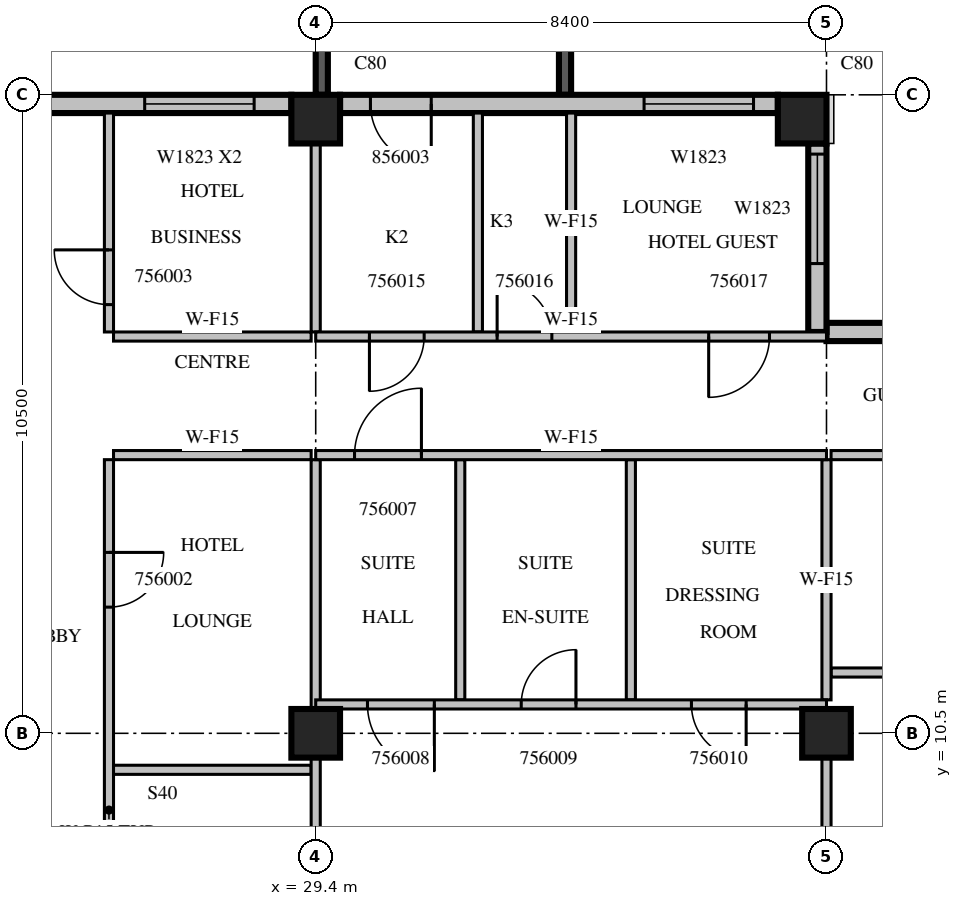
"""IFC4 building model, lengths in metres.
Left out: names, types, materials, properties, quantities, classifications, styles, units other than length and angle.
Written with IfcOpenShell. Run it as: python <this file> out.ifc"""

import sys

from ifc_helpers import new_model, si_unit, direction, frame, frame_2d, origin, origin_2d, place, context, subcontext, project, spatial, rectangle, extrude, source, transform, mapped, element, fill, save


model = new_model("IFC4")
c1 = context("Model", 3, precision=1e-05, world=origin(), true_north=direction((0.0, 1.0)))
c2 = subcontext(c1, "Body", "Model", "MODEL_VIEW")
j1 = project(units=[si_unit("LENGTHUNIT", "METRE"), si_unit("PLANEANGLEUNIT", "RADIAN")], contexts=[c1])
p1 = place(None, origin())
s1 = spatial("IfcSite", under=j1, at=p1, CompositionType="ELEMENT")
p2 = place(p1, origin())
s2 = spatial("IfcBuilding", under=s1, at=p2, CompositionType="ELEMENT")
p3 = place(p2, frame((0.0, 0.0, 246.2)))
s3 = spatial("IfcBuildingStorey", under=s2, at=p3, CompositionType="ELEMENT", Elevation=246.2)
m1 = source(origin(), c2, "Body", "SweptSolid", [
    extrude(rectangle(XDim=0.8, YDim=0.8, at=origin_2d()), origin(), (0.0, 0.0, 1.0), 3.8),
])
for number, where, z_axis, x_axis in (
    (1, (29.4, 10.5, 0.0), (0.0, 0.0, 1.0), (1.0, 0.0, 0.0)),
    (2, (37.8, 10.5, 0.0), (0.0, 0.0, 1.0), (1.0, 0.0, 0.0)),
    (3, (29.4, 20.6, 0.0), (0.0, 0.0, 1.0), (1.0, 0.0, 0.0)),
    (4, (37.4, 20.6, 0.0), (0.0, 0.0, 1.0), (1.0, 0.0, 0.0)),
):
    element("IfcColumn", number, at=place(p3, frame(where, z_axis=z_axis, x_axis=x_axis)), inside=s3, PredefinedType="COLUMN", context=c2, shape_type="MappedRepresentation", body=[
        mapped(m1, transform((0.0, 0.0, 0.0), scale=1.0)),
    ])
m2 = source(origin(), c2, "Body", "SweptSolid", [
    extrude(rectangle(XDim=3.9, YDim=0.2, at=frame_2d((1.95, 0.0))), origin(), (0.0, 0.0, 1.0), 3.4),
])
p4 = place(p3, frame((33.5, 21.0, 0.0), z_axis=(0.0, 0.0, 1.0), x_axis=(0.0, 1.0, 0.0)))
e5 = element("IfcWall", 5, at=p4, inside=s3, PredefinedType="SOLIDWALL", context=c2, shape_type="MappedRepresentation", body=[
    mapped(m2, transform((0.0, 0.0, 0.0), scale=1.0)),
])
m3 = source(origin(), c2, "Body", "SweptSolid", [
    extrude(rectangle(XDim=2.4, YDim=2.3, at=frame_2d((1.2, 1.15))), frame((0.0, 0.11, 0.0), z_axis=(0.0, -1.0, 0.0), x_axis=(1.0, 0.0, 0.0)), (0.0, 0.0, 1.0), 0.22),
])
p5 = place(p4, frame((0.75, 0.0, 0.6)))
e6 = element("IfcOpeningElement", 6, at=p5, cuts=e5, PredefinedType="OPENING", context=c2, shape_type="MappedRepresentation", body=[
    mapped(m3, transform((0.0, 0.0, 0.0), scale=1.0)),
])
p6 = place(p3, frame((29.5, 21.0, 0.0), z_axis=(0.0, 0.0, 1.0), x_axis=(0.0, 1.0, 0.0)))
e7 = element("IfcWall", 7, at=p6, inside=s3, PredefinedType="SOLIDWALL", context=c2, shape_type="MappedRepresentation", body=[
    mapped(m2, transform((0.0, 0.0, 0.0), scale=1.0)),
])
p7 = place(p6, frame((0.75, 0.0, 0.6)))
e8 = element("IfcOpeningElement", 8, at=p7, cuts=e7, PredefinedType="OPENING", context=c2, shape_type="MappedRepresentation", body=[
    mapped(m3, transform((0.0, 0.0, 0.0), scale=1.0)),
])
m4 = source(origin(), c2, "Body", "SweptSolid", [
    extrude(rectangle(XDim=15.96, YDim=0.3, at=frame_2d((7.98, 0.0))), origin(), (0.0, 0.0, 1.0), 3.4),
])
p8 = place(p3, frame((53.76, 17.1, 0.0), z_axis=(0.0, 0.0, 1.0), x_axis=(-1.0, 0.0, 0.0)))
e9 = element("IfcWall", 9, at=p8, inside=s3, PredefinedType="STANDARD", context=c2, shape_type="MappedRepresentation", body=[
    mapped(m4, transform((0.0, 0.0, 0.0), scale=1.0)),
])
m5 = source(origin(), c2, "Body", "SweptSolid", [
    extrude(rectangle(XDim=3.0, YDim=2.3, at=frame_2d((1.5, 1.15))), frame((0.0, 0.16, 0.0), z_axis=(0.0, -1.0, 0.0), x_axis=(1.0, 0.0, 0.0)), (0.0, 0.0, 1.0), 0.32),
])
p9 = place(p8, frame((0.6, 0.0, 0.6)))
e10 = element("IfcOpeningElement", 10, at=p9, cuts=e9, PredefinedType="OPENING", context=c2, shape_type="MappedRepresentation", body=[
    mapped(m5, transform((0.0, 0.0, 0.0), scale=1.0)),
])
p10 = place(p8, frame((4.8, 0.0, 0.6)))
e11 = element("IfcOpeningElement", 11, at=p10, cuts=e9, PredefinedType="OPENING", context=c2, shape_type="MappedRepresentation", body=[
    mapped(m5, transform((0.0, 0.0, 0.0), scale=1.0)),
])
m6 = source(origin(), c2, "Body", "SweptSolid", [
    extrude(rectangle(XDim=3.6, YDim=2.3, at=frame_2d((1.8, 1.15))), frame((0.0, 0.16, 0.0), z_axis=(0.0, -1.0, 0.0), x_axis=(1.0, 0.0, 0.0)), (0.0, 0.0, 1.0), 0.32),
])
p11 = place(p8, frame((9.54, 0.0, 0.6)))
e12 = element("IfcOpeningElement", 12, at=p11, cuts=e9, PredefinedType="OPENING", context=c2, shape_type="MappedRepresentation", body=[
    mapped(m6, transform((0.0, 0.0, 0.0), scale=1.0)),
])
m7 = source(origin(), c2, "Body", "SweptSolid", [
    extrude(rectangle(XDim=3.1, YDim=0.3, at=frame_2d((1.55, 0.0))), origin(), (0.0, 0.0, 1.0), 3.4),
])
p12 = place(p3, frame((37.65, 17.1, 0.0), z_axis=(0.0, 0.0, 1.0), x_axis=(0.0, 1.0, 0.0)))
e13 = element("IfcWall", 13, at=p12, inside=s3, PredefinedType="STANDARD", context=c2, shape_type="MappedRepresentation", body=[
    mapped(m7, transform((0.0, 0.0, 0.0), scale=1.0)),
])
m8 = source(origin(), c2, "Body", "SweptSolid", [
    extrude(rectangle(XDim=1.8, YDim=2.3, at=frame_2d((0.9, 1.15))), frame((0.0, 0.16, 0.0), z_axis=(0.0, -1.0, 0.0), x_axis=(1.0, 0.0, 0.0)), (0.0, 0.0, 1.0), 0.32),
])
p13 = place(p12, frame((1.125, 0.0, 0.6)))
e14 = element("IfcOpeningElement", 14, at=p13, cuts=e13, PredefinedType="OPENING", context=c2, shape_type="MappedRepresentation", body=[
    mapped(m8, transform((0.0, 0.0, 0.0), scale=1.0)),
])
m9 = source(origin(), c2, "Body", "SweptSolid", [
    extrude(rectangle(XDim=7.2, YDim=0.3, at=frame_2d((3.6, 0.0))), origin(), (0.0, 0.0, 1.0), 3.4),
])
p14 = place(p3, frame((37.0, 20.85, 0.0), z_axis=(0.0, 0.0, 1.0), x_axis=(-1.0, 0.0, 0.0)))
e15 = element("IfcWall", 15, at=p14, inside=s3, PredefinedType="STANDARD", context=c2, shape_type="MappedRepresentation", body=[
    mapped(m9, transform((0.0, 0.0, 0.0), scale=1.0)),
])
p15 = place(p14, frame((0.4, 0.0, 0.6)))
e16 = element("IfcOpeningElement", 16, at=p15, cuts=e15, PredefinedType="OPENING", context=c2, shape_type="MappedRepresentation", body=[
    mapped(m8, transform((0.0, 0.0, 0.0), scale=1.0)),
])
m10 = source(origin(), c2, "Body", "SweptSolid", [
    extrude(rectangle(XDim=1.0, YDim=2.1, at=frame_2d((0.5, 1.05))), frame((0.0, 0.16, 0.0), z_axis=(0.0, -1.0, 0.0), x_axis=(1.0, 0.0, 0.0)), (0.0, 0.0, 1.0), 0.32),
])
p16 = place(p14, frame((5.7, 0.0, 0.0)))
e17 = element("IfcOpeningElement", 17, at=p16, cuts=e15, PredefinedType="OPENING", context=c2, shape_type="MappedRepresentation", body=[
    mapped(m10, transform((0.0, 0.0, 0.0), scale=1.0)),
])
p17 = place(p3, frame((29.0, 20.85, 0.0), z_axis=(0.0, 0.0, 1.0), x_axis=(-1.0, 0.0, 0.0)))
e18 = element("IfcWall", 18, at=p17, inside=s3, PredefinedType="STANDARD", context=c2, shape_type="MappedRepresentation", body=[
    mapped(m9, transform((0.0, 0.0, 0.0), scale=1.0)),
])
p18 = place(p17, frame((0.613, 0.0, 0.6)))
e19 = element("IfcOpeningElement", 19, at=p18, cuts=e18, PredefinedType="OPENING", context=c2, shape_type="MappedRepresentation", body=[
    mapped(m8, transform((0.0, 0.0, 0.0), scale=1.0)),
])
p19 = place(p17, frame((5.0, 0.0, 0.6)))
e20 = element("IfcOpeningElement", 20, at=p19, cuts=e18, PredefinedType="OPENING", context=c2, shape_type="MappedRepresentation", body=[
    mapped(m8, transform((0.0, 0.0, 0.0), scale=1.0)),
])
m11 = source(origin(), c2, "Body", "SweptSolid", [
    extrude(rectangle(XDim=11.525, YDim=0.15, at=frame_2d((5.763, 0.0))), origin(), (0.0, 0.0, 1.0), 3.4),
])
p20 = place(p3, frame((26.0, 15.0, 0.0), z_axis=(0.0, 0.0, 1.0), x_axis=(0.0, -1.0, 0.0)))
e21 = element("IfcWall", 21, at=p20, inside=s3, PredefinedType="PARTITIONING", context=c2, shape_type="MappedRepresentation", body=[
    mapped(m11, transform((0.0, 0.0, 0.0), scale=1.0)),
])
m12 = source(origin(), c2, "Body", "SweptSolid", [
    extrude(rectangle(XDim=0.9, YDim=2.1, at=frame_2d((0.45, 1.05))), frame((0.0, 0.085, 0.0), z_axis=(0.0, -1.0, 0.0), x_axis=(1.0, 0.0, 0.0)), (0.0, 0.0, 1.0), 0.17),
])
p21 = place(p20, frame((8.162, 0.0, 0.0)))
e22 = element("IfcOpeningElement", 22, at=p21, cuts=e21, PredefinedType="OPENING", context=c2, shape_type="MappedRepresentation", body=[
    mapped(m12, transform((0.0, 0.0, 0.0), scale=1.0)),
])
p22 = place(p20, frame((1.525, 0.0, 0.0)))
e23 = element("IfcOpeningElement", 23, at=p22, cuts=e21, PredefinedType="OPENING", context=c2, shape_type="MappedRepresentation", body=[
    mapped(m12, transform((0.0, 0.0, 0.0), scale=1.0)),
])
m13 = source(origin(), c2, "Body", "SweptSolid", [
    extrude(rectangle(XDim=3.6, YDim=0.15, at=frame_2d((1.8, 0.0))), origin(), (0.0, 0.0, 1.0), 3.4),
])
p23 = place(p3, frame((26.0, 20.7, 0.0), z_axis=(0.0, 0.0, 1.0), x_axis=(0.0, -1.0, 0.0)))
e24 = element("IfcWall", 24, at=p23, inside=s3, PredefinedType="PARTITIONING", context=c2, shape_type="MappedRepresentation", body=[
    mapped(m13, transform((0.0, 0.0, 0.0), scale=1.0)),
])
p24 = place(p23, frame((2.25, 0.0, 0.0)))
e25 = element("IfcOpeningElement", 25, at=p24, cuts=e24, PredefinedType="OPENING", context=c2, shape_type="MappedRepresentation", body=[
    mapped(m12, transform((0.0, 0.0, 0.0), scale=1.0)),
])
p25 = place(p3, frame((29.325, 9.9, 0.0), z_axis=(0.0, 0.0, 1.0), x_axis=(-1.0, 0.0, 0.0)))
e26 = element("IfcWall", 26, at=p25, inside=s3, PredefinedType="PARTITIONING", context=c2, shape_type="SweptSolid", body=[
    extrude(rectangle(XDim=3.25, YDim=0.15, at=frame_2d((1.625, 0.0))), origin(), (0.0, 0.0, 1.0), 3.4),
])
m14 = source(origin(), c2, "Body", "SweptSolid", [
    extrude(rectangle(XDim=3.25, YDim=0.15, at=frame_2d((1.625, 0.0))), origin(), (0.0, 0.0, 1.0), 3.4),
])
for number, where, z_axis, x_axis in (
    (27, (29.325, 15.075, 0.0), (0.0, 0.0, 1.0), (-1.0, 0.0, 0.0)),
    (28, (26.075, 17.025, 0.0), (0.0, 0.0, 1.0), (1.0, 0.0, 0.0)),
):
    element("IfcWall", number, at=place(p3, frame(where, z_axis=z_axis, x_axis=x_axis)), inside=s3, PredefinedType="PARTITIONING", context=c2, shape_type="MappedRepresentation", body=[
        mapped(m14, transform((0.0, 0.0, 0.0), scale=1.0)),
    ])
m15 = source(origin(), c2, "Body", "SweptSolid", [
    extrude(rectangle(XDim=6.626, YDim=0.15, at=frame_2d((3.313, 0.0))), origin(), (0.0, 0.0, 1.0), 3.4),
])
p26 = place(p3, frame((29.4, 3.475, 0.0), z_axis=(0.0, 0.0, 1.0), x_axis=(0.0, 1.0, 0.0)))
e29 = element("IfcWall", 29, at=p26, inside=s3, PredefinedType="PARTITIONING", context=c2, shape_type="MappedRepresentation", body=[
    mapped(m15, transform((0.0, 0.0, 0.0), scale=1.0)),
])
m16 = source(origin(), c2, "Body", "SweptSolid", [
    extrude(rectangle(XDim=4.101, YDim=0.15, at=frame_2d((2.05, 0.0))), origin(), (0.0, 0.0, 1.0), 3.4),
])
p27 = place(p3, frame((29.4, 10.899, 0.0), z_axis=(0.0, 0.0, 1.0), x_axis=(0.0, 1.0, 0.0)))
e30 = element("IfcWall", 30, at=p27, inside=s3, PredefinedType="PARTITIONING", context=c2, shape_type="MappedRepresentation", body=[
    mapped(m16, transform((0.0, 0.0, 0.0), scale=1.0)),
])
m17 = source(origin(), c2, "Body", "SweptSolid", [
    extrude(rectangle(XDim=3.101, YDim=0.15, at=frame_2d((1.55, 0.0))), origin(), (0.0, 0.0, 1.0), 3.4),
])
p28 = place(p3, frame((29.4, 17.1, 0.0), z_axis=(0.0, 0.0, 1.0), x_axis=(0.0, 1.0, 0.0)))
e31 = element("IfcWall", 31, at=p28, inside=s3, PredefinedType="PARTITIONING", context=c2, shape_type="MappedRepresentation", body=[
    mapped(m17, transform((0.0, 0.0, 0.0), scale=1.0)),
])
m18 = source(origin(), c2, "Body", "SweptSolid", [
    extrude(rectangle(XDim=6.45, YDim=0.15, at=frame_2d((3.225, 0.0))), origin(), (0.0, 0.0, 1.0), 3.4),
])
p29 = place(p3, frame((37.875, 11.5, 0.0), z_axis=(0.0, 0.0, 1.0), x_axis=(1.0, 0.0, 0.0)))
e32 = element("IfcWall", 32, at=p29, inside=s3, PredefinedType="PARTITIONING", context=c2, shape_type="MappedRepresentation", body=[
    mapped(m18, transform((0.0, 0.0, 0.0), scale=1.0)),
])
p30 = place(p3, frame((44.325, 15.075, 0.0), z_axis=(0.0, 0.0, 1.0), x_axis=(-1.0, 0.0, 0.0)))
e33 = element("IfcWall", 33, at=p30, inside=s3, PredefinedType="PARTITIONING", context=c2, shape_type="MappedRepresentation", body=[
    mapped(m18, transform((0.0, 0.0, 0.0), scale=1.0)),
])
p31 = place(p30, frame((2.812, 0.0, 0.0)))
e34 = element("IfcOpeningElement", 34, at=p31, cuts=e33, PredefinedType="OPENING", context=c2, shape_type="MappedRepresentation", body=[
    mapped(m12, transform((0.0, 0.0, 0.0), scale=1.0)),
])
m19 = source(origin(), c2, "Body", "SweptSolid", [
    extrude(rectangle(XDim=3.95, YDim=0.15, at=frame_2d((1.975, 0.0))), origin(), (0.0, 0.0, 1.0), 3.4),
])
for number, where, z_axis, x_axis in (
    (35, (31.777, 11.05, 0.0), (0.0, 0.0, 1.0), (0.0, 1.0, 0.0)),
    (36, (34.583, 11.05, 0.0), (0.0, 0.0, 1.0), (0.0, 1.0, 0.0)),
):
    element("IfcWall", number, at=place(p3, frame(where, z_axis=z_axis, x_axis=x_axis)), inside=s3, PredefinedType="PARTITIONING", context=c2, shape_type="MappedRepresentation", body=[
        mapped(m19, transform((0.0, 0.0, 0.0), scale=1.0)),
    ])
m20 = source(origin(), c2, "Body", "SweptSolid", [
    extrude(rectangle(XDim=9.302, YDim=0.15, at=frame_2d((4.651, 0.0))), origin(), (0.0, 0.0, 1.0), 3.4),
])
p32 = place(p3, frame((37.8, 0.799, 0.0), z_axis=(0.0, 0.0, 1.0), x_axis=(0.0, 1.0, 0.0)))
e37 = element("IfcWall", 37, at=p32, inside=s3, PredefinedType="PARTITIONING", context=c2, shape_type="MappedRepresentation", body=[
    mapped(m20, transform((0.0, 0.0, 0.0), scale=1.0)),
])
p33 = place(p3, frame((37.8, 11.05, 0.0), z_axis=(0.0, 0.0, 1.0), x_axis=(0.0, 1.0, 0.0)))
e38 = element("IfcWall", 38, at=p33, inside=s3, PredefinedType="PARTITIONING", context=c2, shape_type="MappedRepresentation", body=[
    mapped(m19, transform((0.0, 0.0, 0.0), scale=1.0)),
])
m21 = source(origin(), c2, "Body", "SweptSolid", [
    extrude(rectangle(XDim=8.4, YDim=0.15, at=frame_2d((4.2, 0.0))), origin(), (0.0, 0.0, 1.0), 3.4),
])
p34 = place(p3, frame((37.8, 10.975, 0.0), z_axis=(0.0, 0.0, 1.0), x_axis=(-1.0, 0.0, 0.0)))
e39 = element("IfcWall", 39, at=p34, inside=s3, PredefinedType="PARTITIONING", context=c2, shape_type="MappedRepresentation", body=[
    mapped(m21, transform((0.0, 0.0, 0.0), scale=1.0)),
])
m22 = source(origin(), c2, "Body", "SweptSolid", [
    extrude(rectangle(XDim=1.1, YDim=2.1, at=frame_2d((0.55, 1.05))), frame((0.0, 0.085, 0.0), z_axis=(0.0, -1.0, 0.0), x_axis=(1.0, 0.0, 0.0)), (0.0, 0.0, 1.0), 0.17),
])
p35 = place(p34, frame((6.449, 0.0, 0.0)))
e40 = element("IfcOpeningElement", 40, at=p35, cuts=e39, PredefinedType="OPENING", context=c2, shape_type="MappedRepresentation", body=[
    mapped(m22, transform((0.0, 0.0, 0.0), scale=1.0)),
])
p36 = place(p34, frame((4.12, 0.0, 0.0)))
e41 = element("IfcOpeningElement", 41, at=p36, cuts=e39, PredefinedType="OPENING", context=c2, shape_type="MappedRepresentation", body=[
    mapped(m12, transform((0.0, 0.0, 0.0), scale=1.0)),
])
p37 = place(p34, frame((1.321, 0.0, 0.0)))
e42 = element("IfcOpeningElement", 42, at=p37, cuts=e39, PredefinedType="OPENING", context=c2, shape_type="MappedRepresentation", body=[
    mapped(m12, transform((0.0, 0.0, 0.0), scale=1.0)),
])
for number, where, z_axis, x_axis in (
    (43, (32.067, 20.7, 0.0), (0.0, 0.0, 1.0), (0.0, -1.0, 0.0)),
    (44, (33.6, 17.1, 0.0), (0.0, 0.0, 1.0), (0.0, 1.0, 0.0)),
):
    element("IfcWall", number, at=place(p3, frame(where, z_axis=z_axis, x_axis=x_axis)), inside=s3, PredefinedType="PARTITIONING", context=c2, shape_type="MappedRepresentation", body=[
        mapped(m13, transform((0.0, 0.0, 0.0), scale=1.0)),
    ])
p38 = place(p3, frame((37.8, 15.075, 0.0), z_axis=(0.0, 0.0, 1.0), x_axis=(-1.0, 0.0, 0.0)))
e45 = element("IfcWall", 45, at=p38, inside=s3, PredefinedType="PARTITIONING", context=c2, shape_type="MappedRepresentation", body=[
    mapped(m21, transform((0.0, 0.0, 0.0), scale=1.0)),
])
p39 = place(p38, frame((6.662, 0.0, 0.0)))
e46 = element("IfcOpeningElement", 46, at=p39, cuts=e45, PredefinedType="OPENING", context=c2, shape_type="MappedRepresentation", body=[
    mapped(m22, transform((0.0, 0.0, 0.0), scale=1.0)),
])
p40 = place(p3, frame((29.4, 17.025, 0.0), z_axis=(0.0, 0.0, 1.0), x_axis=(1.0, 0.0, 0.0)))
e47 = element("IfcWall", 47, at=p40, inside=s3, PredefinedType="PARTITIONING", context=c2, shape_type="MappedRepresentation", body=[
    mapped(m21, transform((0.0, 0.0, 0.0), scale=1.0)),
])
p41 = place(p40, frame((0.883, 0.0, 0.0)))
e48 = element("IfcOpeningElement", 48, at=p41, cuts=e47, PredefinedType="OPENING", context=c2, shape_type="MappedRepresentation", body=[
    mapped(m12, transform((0.0, 0.0, 0.0), scale=1.0)),
])
p42 = place(p40, frame((2.983, 0.0, 0.0)))
e49 = element("IfcOpeningElement", 49, at=p42, cuts=e47, PredefinedType="OPENING", context=c2, shape_type="MappedRepresentation", body=[
    mapped(m12, transform((0.0, 0.0, 0.0), scale=1.0)),
])
m23 = source(origin(), c2, "Body", "SweptSolid", [
    extrude(rectangle(XDim=1.0, YDim=2.1, at=frame_2d((0.5, 1.05))), frame((0.0, 0.085, 0.0), z_axis=(0.0, -1.0, 0.0), x_axis=(1.0, 0.0, 0.0)), (0.0, 0.0, 1.0), 0.17),
])
p43 = place(p40, frame((6.463, 0.0, 0.0)))
e50 = element("IfcOpeningElement", 50, at=p43, cuts=e47, PredefinedType="OPENING", context=c2, shape_type="MappedRepresentation", body=[
    mapped(m23, transform((0.0, 0.0, 0.0), scale=1.0)),
])
m24 = source(origin(), c2, "Body", "SweptSolid", [
    extrude(rectangle(XDim=1.8, YDim=2.3, at=frame_2d((0.9, 1.15))), frame((0.0, 0.03, 0.0), z_axis=(0.0, -1.0, 0.0), x_axis=(1.0, 0.0, 0.0)), (0.0, 0.0, 1.0), 0.06),
])
p44 = place(p13, origin())
e51 = element("IfcWindow", 51, at=p44, inside=s3, PartitioningType="SINGLE_PANEL", PredefinedType="WINDOW", context=c2, shape_type="MappedRepresentation", body=[
    mapped(m24, transform((0.0, 0.0, 0.0), scale=1.0)),
])
fill(e14, e51)
p45 = place(p15, origin())
e52 = element("IfcWindow", 52, at=p45, inside=s3, PartitioningType="SINGLE_PANEL", PredefinedType="WINDOW", context=c2, shape_type="MappedRepresentation", body=[
    mapped(m24, transform((0.0, 0.0, 0.0), scale=1.0)),
])
fill(e16, e52)
p46 = place(p18, origin())
e53 = element("IfcWindow", 53, at=p46, inside=s3, PartitioningType="SINGLE_PANEL", PredefinedType="WINDOW", context=c2, shape_type="MappedRepresentation", body=[
    mapped(m24, transform((0.0, 0.0, 0.0), scale=1.0)),
])
fill(e19, e53)
m25 = source(origin(), c2, "Body", "SweptSolid", [
    extrude(rectangle(XDim=0.9, YDim=2.1, at=frame_2d((0.45, 1.05))), frame((0.0, 0.025, 0.0), z_axis=(0.0, -1.0, 0.0), x_axis=(1.0, 0.0, 0.0)), (0.0, 0.0, 1.0), 0.05),
])
p47 = place(p22, origin())
e54 = element("IfcDoor", 54, at=p47, inside=s3, OperationType="SINGLE_SWING_LEFT", PredefinedType="DOOR", context=c2, shape_type="MappedRepresentation", body=[
    mapped(m25, transform((0.0, 0.0, 0.0), scale=1.0)),
])
fill(e23, e54)
p48 = place(p24, origin())
e55 = element("IfcDoor", 55, at=p48, inside=s3, OperationType="SINGLE_SWING_RIGHT", PredefinedType="DOOR", context=c2, shape_type="MappedRepresentation", body=[
    mapped(m25, transform((0.0, 0.0, 0.0), scale=1.0)),
])
fill(e25, e55)
m26 = source(origin(), c2, "Body", "SweptSolid", [
    extrude(rectangle(XDim=1.1, YDim=2.1, at=frame_2d((0.55, 1.05))), frame((0.0, 0.025, 0.0), z_axis=(0.0, -1.0, 0.0), x_axis=(1.0, 0.0, 0.0)), (0.0, 0.0, 1.0), 0.05),
])
p49 = place(p39, origin())
e56 = element("IfcDoor", 56, at=p49, inside=s3, OperationType="SINGLE_SWING_RIGHT", PredefinedType="DOOR", context=c2, shape_type="MappedRepresentation", body=[
    mapped(m26, transform((0.0, 0.0, 0.0), scale=1.0)),
])
fill(e46, e56)
p50 = place(p35, origin())
e57 = element("IfcDoor", 57, at=p50, inside=s3, OperationType="SINGLE_SWING_LEFT", PredefinedType="DOOR", context=c2, shape_type="MappedRepresentation", body=[
    mapped(m26, transform((0.0, 0.0, 0.0), scale=1.0)),
])
fill(e40, e57)
p51 = place(p36, origin())
e58 = element("IfcDoor", 58, at=p51, inside=s3, OperationType="SINGLE_SWING_RIGHT", PredefinedType="DOOR", context=c2, shape_type="MappedRepresentation", body=[
    mapped(m25, transform((0.0, 0.0, 0.0), scale=1.0)),
])
fill(e41, e58)
p52 = place(p37, origin())
e59 = element("IfcDoor", 59, at=p52, inside=s3, OperationType="SINGLE_SWING_LEFT", PredefinedType="DOOR", context=c2, shape_type="MappedRepresentation", body=[
    mapped(m25, transform((0.0, 0.0, 0.0), scale=1.0)),
])
fill(e42, e59)
p53 = place(p41, origin())
e60 = element("IfcDoor", 60, at=p53, inside=s3, OperationType="SINGLE_SWING_RIGHT", PredefinedType="DOOR", context=c2, shape_type="MappedRepresentation", body=[
    mapped(m25, transform((0.0, 0.0, 0.0), scale=1.0)),
])
fill(e48, e60)
p54 = place(p42, origin())
e61 = element("IfcDoor", 61, at=p54, inside=s3, OperationType="SINGLE_SWING_LEFT", PredefinedType="DOOR", context=c2, shape_type="MappedRepresentation", body=[
    mapped(m25, transform((0.0, 0.0, 0.0), scale=1.0)),
])
fill(e49, e61)
m27 = source(origin(), c2, "Body", "SweptSolid", [
    extrude(rectangle(XDim=1.0, YDim=2.1, at=frame_2d((0.5, 1.05))), frame((0.0, 0.025, 0.0), z_axis=(0.0, -1.0, 0.0), x_axis=(1.0, 0.0, 0.0)), (0.0, 0.0, 1.0), 0.05),
])
p55 = place(p43, origin())
e62 = element("IfcDoor", 62, at=p55, inside=s3, OperationType="SINGLE_SWING_RIGHT", PredefinedType="DOOR", context=c2, shape_type="MappedRepresentation", body=[
    mapped(m27, transform((0.0, 0.0, 0.0), scale=1.0)),
])
fill(e50, e62)
p56 = place(p16, origin())
e63 = element("IfcDoor", 63, at=p56, inside=s3, OperationType="SINGLE_SWING_LEFT", PredefinedType="DOOR", context=c2, shape_type="MappedRepresentation", body=[
    mapped(m27, transform((0.0, 0.0, 0.0), scale=1.0)),
])
fill(e17, e63)
save(model, sys.argv[1])
